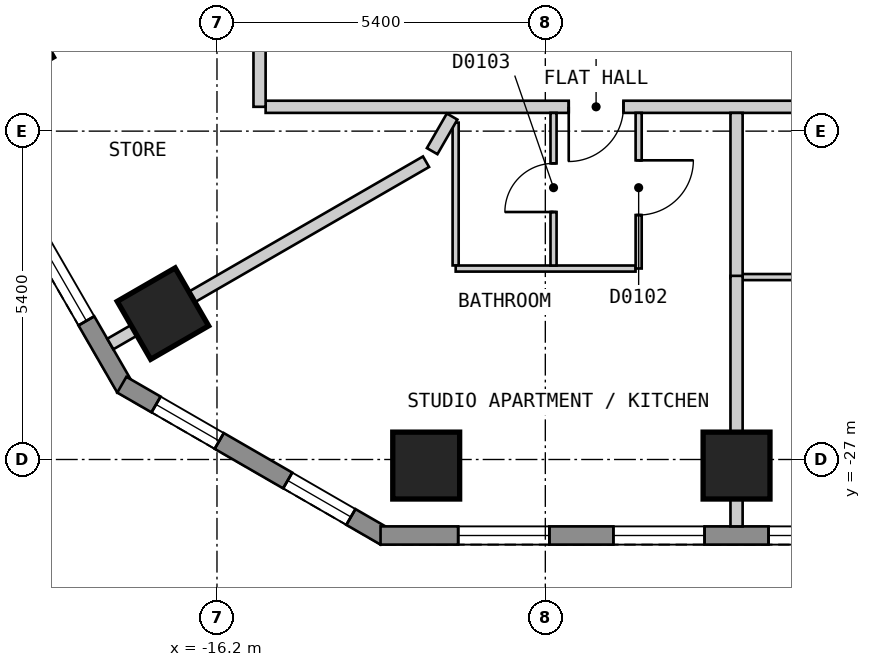
"""IFC4 building model, lengths in metres.
Left out: names, types, materials, properties, quantities, classifications, styles, units other than length and angle.
Written with IfcOpenShell. Run it as: python <this file> out.ifc"""

import sys

from ifc_helpers import new_model, si_unit, direction, frame, frame_2d, origin, origin_2d, place, context, subcontext, project, spatial, polyline, rectangle, outline, extrude, element, fill, save


model = new_model("IFC4")
c1 = context("Model", 3, precision=1e-05, world=origin(), true_north=direction((0.0, 1.0)))
c2 = subcontext(c1, "Body", "Model", "MODEL_VIEW")
j1 = project(units=[si_unit("LENGTHUNIT", "METRE"), si_unit("PLANEANGLEUNIT", "RADIAN")], contexts=[c1])
p1 = place(None, origin())
s1 = spatial("IfcSite", under=j1, at=p1, CompositionType="ELEMENT")
p2 = place(p1, origin())
s2 = spatial("IfcBuilding", under=s1, at=p2, CompositionType="ELEMENT")
p3 = place(p2, frame((0.0, 0.0, 29.4)))
s3 = spatial("IfcBuildingStorey", under=s2, at=p3, CompositionType="ELEMENT", Elevation=29.4)
for number, where, z_axis, x_axis in (
    (1, (-19.641, -20.181, 0.0), (0.0, 0.0, 1.0), (0.5, -0.866, 0.0)),
    (2, (-17.089, -24.601, 0.0), (0.0, 0.0, 1.0), (0.5, -0.866, 0.0)),
    (3, (-12.759, -27.1, 0.0), (0.0, 0.0, 1.0), (1.0, 0.0, 0.0)),
    (4, (-7.655, -27.1, 0.0), (0.0, 0.0, 1.0), (1.0, 0.0, 0.0)),
):
    element("IfcColumn", number, at=place(p3, frame(where, z_axis=z_axis, x_axis=x_axis)), inside=s3, PredefinedType="COLUMN", context=c2, shape_type="SweptSolid", body=[
        extrude(rectangle(XDim=1.1, YDim=1.1, at=origin_2d()), origin(), (0.0, 0.0, 1.0), 3.0),
    ])
p4 = place(p3, frame((-31.22, -2.425, 0.0), z_axis=(0.0, 0.0, 1.0), x_axis=(0.500001938803, -0.866024284413, 0.0)))
e5 = element("IfcWall", 5, at=p4, inside=s3, PredefinedType="SOLIDWALL", context=c2, shape_type="SweptSolid", body=[
    extrude(outline(polyline([(0.0, -0.15), (27.02, -0.15), (26.94, 0.15), (0.08, 0.15), (0.0, -0.15)])), origin(), (0.0, 0.0, 1.0), 2.7),
])
p5 = place(p4, frame((1.277, 0.0, 0.15)))
e6 = element("IfcOpeningElement", 6, at=p5, cuts=e5, PredefinedType="OPENING", context=c2, shape_type="SweptSolid", body=[
    extrude(rectangle(XDim=1.5, YDim=2.1, at=frame_2d((0.75, 1.05))), frame((0.0, 0.16, 0.0), z_axis=(0.0, -1.0, 0.0), x_axis=(1.0, 0.0, 0.0)), (0.0, 0.0, 1.0), 0.32),
])
p6 = place(p4, frame((3.829, 0.0, 0.15)))
e7 = element("IfcOpeningElement", 7, at=p6, cuts=e5, PredefinedType="OPENING", context=c2, shape_type="SweptSolid", body=[
    extrude(rectangle(XDim=1.5, YDim=2.1, at=frame_2d((0.75, 1.05))), frame((0.0, 0.16, 0.0), z_axis=(0.0, -1.0, 0.0), x_axis=(1.0, 0.0, 0.0)), (0.0, 0.0, 1.0), 0.32),
])
p7 = place(p4, frame((6.382, 0.0, 0.15)))
e8 = element("IfcOpeningElement", 8, at=p7, cuts=e5, PredefinedType="OPENING", context=c2, shape_type="SweptSolid", body=[
    extrude(rectangle(XDim=1.5, YDim=2.1, at=frame_2d((0.75, 1.05))), frame((0.0, 0.16, 0.0), z_axis=(0.0, -1.0, 0.0), x_axis=(1.0, 0.0, 0.0)), (0.0, 0.0, 1.0), 0.32),
])
p8 = place(p4, frame((8.933, 0.0, 0.15)))
e9 = element("IfcOpeningElement", 9, at=p8, cuts=e5, PredefinedType="OPENING", context=c2, shape_type="SweptSolid", body=[
    extrude(rectangle(XDim=1.5, YDim=2.1, at=frame_2d((0.75, 1.05))), frame((0.0, 0.16, 0.0), z_axis=(0.0, -1.0, 0.0), x_axis=(1.0, 0.0, 0.0)), (0.0, 0.0, 1.0), 0.32),
])
p9 = place(p4, frame((11.485, 0.0, 0.15)))
e10 = element("IfcOpeningElement", 10, at=p9, cuts=e5, PredefinedType="OPENING", context=c2, shape_type="SweptSolid", body=[
    extrude(rectangle(XDim=1.5, YDim=2.1, at=frame_2d((0.75, 1.05))), frame((0.0, 0.16, 0.0), z_axis=(0.0, -1.0, 0.0), x_axis=(1.0, 0.0, 0.0)), (0.0, 0.0, 1.0), 0.32),
])
p10 = place(p4, frame((14.037, 0.0, 0.15)))
e11 = element("IfcOpeningElement", 11, at=p10, cuts=e5, PredefinedType="OPENING", context=c2, shape_type="SweptSolid", body=[
    extrude(rectangle(XDim=1.5, YDim=2.1, at=frame_2d((0.75, 1.05))), frame((0.0, 0.16, 0.0), z_axis=(0.0, -1.0, 0.0), x_axis=(1.0, 0.0, 0.0)), (0.0, 0.0, 1.0), 0.32),
])
p11 = place(p4, frame((16.589, 0.0, 0.15)))
e12 = element("IfcOpeningElement", 12, at=p11, cuts=e5, PredefinedType="OPENING", context=c2, shape_type="SweptSolid", body=[
    extrude(rectangle(XDim=1.5, YDim=2.1, at=frame_2d((0.75, 1.05))), frame((0.0, 0.16, 0.0), z_axis=(0.0, -1.0, 0.0), x_axis=(1.0, 0.0, 0.0)), (0.0, 0.0, 1.0), 0.32),
])
p12 = place(p4, frame((19.141, 0.0, 0.15)))
e13 = element("IfcOpeningElement", 13, at=p12, cuts=e5, PredefinedType="OPENING", context=c2, shape_type="SweptSolid", body=[
    extrude(rectangle(XDim=1.5, YDim=2.1, at=frame_2d((0.75, 1.05))), frame((0.0, 0.16, 0.0), z_axis=(0.0, -1.0, 0.0), x_axis=(1.0, 0.0, 0.0)), (0.0, 0.0, 1.0), 0.32),
])
p13 = place(p4, frame((21.693, 0.0, 0.15)))
e14 = element("IfcOpeningElement", 14, at=p13, cuts=e5, PredefinedType="OPENING", context=c2, shape_type="SweptSolid", body=[
    extrude(rectangle(XDim=1.5, YDim=2.1, at=frame_2d((0.75, 1.05))), frame((0.0, 0.16, 0.0), z_axis=(0.0, -1.0, 0.0), x_axis=(1.0, 0.0, 0.0)), (0.0, 0.0, 1.0), 0.32),
])
p14 = place(p4, frame((24.244, 0.0, 0.15)))
e15 = element("IfcOpeningElement", 15, at=p14, cuts=e5, PredefinedType="OPENING", context=c2, shape_type="SweptSolid", body=[
    extrude(rectangle(XDim=1.5, YDim=2.1, at=frame_2d((0.75, 1.05))), frame((0.0, 0.16, 0.0), z_axis=(0.0, -1.0, 0.0), x_axis=(1.0, 0.0, 0.0)), (0.0, 0.0, 1.0), 0.32),
])
p15 = place(p3, frame((-17.765, -25.77, 0.0), z_axis=(0.0, 0.0, 1.0), x_axis=(0.866010750942, -0.50002537861, 0.0)))
e16 = element("IfcWall", 16, at=p15, inside=s3, PredefinedType="SOLIDWALL", context=c2, shape_type="SweptSolid", body=[
    extrude(outline(polyline([(0.0, -0.15), (5.0, -0.15), (4.919, 0.15), (0.08, 0.15), (0.0, -0.15)])), origin(), (0.0, 0.0, 1.0), 2.7),
])
p16 = place(p15, frame((0.65, 0.0, 0.15)))
e17 = element("IfcOpeningElement", 17, at=p16, cuts=e16, PredefinedType="OPENING", context=c2, shape_type="SweptSolid", body=[
    extrude(rectangle(XDim=1.2, YDim=2.1, at=frame_2d((0.6, 1.05))), frame((0.0, 0.16, 0.0), z_axis=(0.0, -1.0, 0.0), x_axis=(1.0, 0.0, 0.0)), (0.0, 0.0, 1.0), 0.32),
])
p17 = place(p15, frame((3.15, 0.0, 0.15)))
e18 = element("IfcOpeningElement", 18, at=p17, cuts=e16, PredefinedType="OPENING", context=c2, shape_type="SweptSolid", body=[
    extrude(rectangle(XDim=1.2, YDim=2.1, at=frame_2d((0.6, 1.05))), frame((0.0, 0.16, 0.0), z_axis=(0.0, -1.0, 0.0), x_axis=(1.0, 0.0, 0.0)), (0.0, 0.0, 1.0), 0.32),
])
p18 = place(p3, frame((-13.51, -28.25, 0.0), z_axis=(0.0, 0.0, 1.0), x_axis=(1.0, 0.0, 0.0)))
e19 = element("IfcWall", 19, at=p18, inside=s3, PredefinedType="SOLIDWALL", context=c2, shape_type="SweptSolid", body=[
    extrude(outline(polyline([(0.0, -0.15), (27.02, -0.15), (26.94, 0.15), (0.08, 0.15), (0.0, -0.15)])), origin(), (0.0, 0.0, 1.0), 2.7),
])
p19 = place(p18, frame((1.277, 0.0, 0.15)))
e20 = element("IfcOpeningElement", 20, at=p19, cuts=e19, PredefinedType="OPENING", context=c2, shape_type="SweptSolid", body=[
    extrude(rectangle(XDim=1.5, YDim=2.1, at=frame_2d((0.75, 1.05))), frame((0.0, 0.16, 0.0), z_axis=(0.0, -1.0, 0.0), x_axis=(1.0, 0.0, 0.0)), (0.0, 0.0, 1.0), 0.32),
])
p20 = place(p18, frame((3.829, 0.0, 0.15)))
e21 = element("IfcOpeningElement", 21, at=p20, cuts=e19, PredefinedType="OPENING", context=c2, shape_type="SweptSolid", body=[
    extrude(rectangle(XDim=1.5, YDim=2.1, at=frame_2d((0.75, 1.05))), frame((0.0, 0.16, 0.0), z_axis=(0.0, -1.0, 0.0), x_axis=(1.0, 0.0, 0.0)), (0.0, 0.0, 1.0), 0.32),
])
p21 = place(p18, frame((6.381, 0.0, 0.15)))
e22 = element("IfcOpeningElement", 22, at=p21, cuts=e19, PredefinedType="OPENING", context=c2, shape_type="SweptSolid", body=[
    extrude(rectangle(XDim=1.5, YDim=2.1, at=frame_2d((0.75, 1.05))), frame((0.0, 0.16, 0.0), z_axis=(0.0, -1.0, 0.0), x_axis=(1.0, 0.0, 0.0)), (0.0, 0.0, 1.0), 0.32),
])
p22 = place(p18, frame((8.933, 0.0, 0.15)))
e23 = element("IfcOpeningElement", 23, at=p22, cuts=e19, PredefinedType="OPENING", context=c2, shape_type="SweptSolid", body=[
    extrude(rectangle(XDim=1.5, YDim=2.1, at=frame_2d((0.75, 1.05))), frame((0.0, 0.16, 0.0), z_axis=(0.0, -1.0, 0.0), x_axis=(1.0, 0.0, 0.0)), (0.0, 0.0, 1.0), 0.32),
])
p23 = place(p18, frame((11.485, 0.0, 0.15)))
e24 = element("IfcOpeningElement", 24, at=p23, cuts=e19, PredefinedType="OPENING", context=c2, shape_type="SweptSolid", body=[
    extrude(rectangle(XDim=1.5, YDim=2.1, at=frame_2d((0.75, 1.05))), frame((0.0, 0.16, 0.0), z_axis=(0.0, -1.0, 0.0), x_axis=(1.0, 0.0, 0.0)), (0.0, 0.0, 1.0), 0.32),
])
p24 = place(p18, frame((14.037, 0.0, 0.15)))
e25 = element("IfcOpeningElement", 25, at=p24, cuts=e19, PredefinedType="OPENING", context=c2, shape_type="SweptSolid", body=[
    extrude(rectangle(XDim=1.5, YDim=2.1, at=frame_2d((0.75, 1.05))), frame((0.0, 0.16, 0.0), z_axis=(0.0, -1.0, 0.0), x_axis=(1.0, 0.0, 0.0)), (0.0, 0.0, 1.0), 0.32),
])
p25 = place(p18, frame((16.589, 0.0, 0.15)))
e26 = element("IfcOpeningElement", 26, at=p25, cuts=e19, PredefinedType="OPENING", context=c2, shape_type="SweptSolid", body=[
    extrude(rectangle(XDim=1.5, YDim=2.1, at=frame_2d((0.75, 1.05))), frame((0.0, 0.16, 0.0), z_axis=(0.0, -1.0, 0.0), x_axis=(1.0, 0.0, 0.0)), (0.0, 0.0, 1.0), 0.32),
])
p26 = place(p18, frame((19.141, 0.0, 0.15)))
e27 = element("IfcOpeningElement", 27, at=p26, cuts=e19, PredefinedType="OPENING", context=c2, shape_type="SweptSolid", body=[
    extrude(rectangle(XDim=1.5, YDim=2.1, at=frame_2d((0.75, 1.05))), frame((0.0, 0.16, 0.0), z_axis=(0.0, -1.0, 0.0), x_axis=(1.0, 0.0, 0.0)), (0.0, 0.0, 1.0), 0.32),
])
p27 = place(p18, frame((21.693, 0.0, 0.15)))
e28 = element("IfcOpeningElement", 28, at=p27, cuts=e19, PredefinedType="OPENING", context=c2, shape_type="SweptSolid", body=[
    extrude(rectangle(XDim=1.5, YDim=2.1, at=frame_2d((0.75, 1.05))), frame((0.0, 0.16, 0.0), z_axis=(0.0, -1.0, 0.0), x_axis=(1.0, 0.0, 0.0)), (0.0, 0.0, 1.0), 0.32),
])
p28 = place(p18, frame((24.245, 0.0, 0.15)))
e29 = element("IfcOpeningElement", 29, at=p28, cuts=e19, PredefinedType="OPENING", context=c2, shape_type="SweptSolid", body=[
    extrude(rectangle(XDim=1.5, YDim=2.1, at=frame_2d((0.75, 1.05))), frame((0.0, 0.16, 0.0), z_axis=(0.0, -1.0, 0.0), x_axis=(1.0, 0.0, 0.0)), (0.0, 0.0, 1.0), 0.32),
])
p29 = place(p3, frame((-15.4, -21.2, 0.0), z_axis=(0.0, 0.0, 1.0), x_axis=(1.0, 0.0, 0.0)))
e30 = element("IfcWall", 30, at=p29, inside=s3, PredefinedType="PARTITIONING", context=c2, shape_type="SweptSolid", body=[
    extrude(rectangle(XDim=30.799, YDim=0.2, at=frame_2d((15.399, 0.0))), origin(), (0.0, 0.0, 1.0), 2.7),
])
p30 = place(p29, frame((4.985, 0.0, 0.0)))
e31 = element("IfcOpeningElement", 31, at=p30, cuts=e30, PredefinedType="OPENING", context=c2, shape_type="SweptSolid", body=[
    extrude(rectangle(XDim=0.9, YDim=2.1, at=frame_2d((0.45, 1.05))), frame((0.0, 0.11, 0.0), z_axis=(0.0, -1.0, 0.0), x_axis=(1.0, 0.0, 0.0)), (0.0, 0.0, 1.0), 0.22),
])
p31 = place(p29, frame((14.901, 0.0, 0.0)))
e32 = element("IfcOpeningElement", 32, at=p31, cuts=e30, PredefinedType="OPENING", context=c2, shape_type="SweptSolid", body=[
    extrude(rectangle(XDim=1.0, YDim=2.1, at=frame_2d((0.5, 1.05))), frame((0.0, 0.11, 0.0), z_axis=(0.0, -1.0, 0.0), x_axis=(1.0, 0.0, 0.0)), (0.0, 0.0, 1.0), 0.22),
])
p32 = place(p29, frame((20.005, 0.0, 0.0)))
e33 = element("IfcOpeningElement", 33, at=p32, cuts=e30, PredefinedType="OPENING", context=c2, shape_type="SweptSolid", body=[
    extrude(rectangle(XDim=1.0, YDim=2.1, at=frame_2d((0.5, 1.05))), frame((0.0, 0.11, 0.0), z_axis=(0.0, -1.0, 0.0), x_axis=(1.0, 0.0, 0.0)), (0.0, 0.0, 1.0), 0.22),
])
p33 = place(p29, frame((24.916, 0.0, 0.0)))
e34 = element("IfcOpeningElement", 34, at=p33, cuts=e30, PredefinedType="OPENING", context=c2, shape_type="SweptSolid", body=[
    extrude(rectangle(XDim=0.9, YDim=2.1, at=frame_2d((0.45, 1.05))), frame((0.0, 0.11, 0.0), z_axis=(0.0, -1.0, 0.0), x_axis=(1.0, 0.0, 0.0)), (0.0, 0.0, 1.0), 0.22),
])
p34 = place(p3, frame((-15.5, -21.2, 0.0), z_axis=(0.0, 0.0, 1.0), x_axis=(0.0, 1.0, 0.0)))
e35 = element("IfcWall", 35, at=p34, inside=s3, PredefinedType="PARTITIONING", context=c2, shape_type="SweptSolid", body=[
    extrude(rectangle(XDim=4.8, YDim=0.2, at=frame_2d((2.4, 0.0))), origin(), (0.0, 0.0, 1.0), 2.7),
])
p35 = place(p34, frame((1.258, 0.0, 0.0)))
e36 = element("IfcOpeningElement", 36, at=p35, cuts=e35, PredefinedType="OPENING", context=c2, shape_type="SweptSolid", body=[
    extrude(rectangle(XDim=0.8, YDim=2.1, at=frame_2d((0.4, 1.05))), frame((0.0, 0.11, 0.0), z_axis=(0.0, -1.0, 0.0), x_axis=(1.0, 0.0, 0.0)), (0.0, 0.0, 1.0), 0.22),
])
p36 = place(p3, frame((-12.275, -21.46, 0.0), z_axis=(0.0, 0.0, 1.0), x_axis=(0.0, -1.0, 0.0)))
e37 = element("IfcWall", 37, at=p36, inside=s3, PredefinedType="PARTITIONING", context=c2, shape_type="SweptSolid", body=[
    extrude(rectangle(XDim=2.349, YDim=0.1, at=frame_2d((1.175, 0.0))), origin(), (0.0, 0.0, 1.0), 2.7),
])
p37 = place(p3, frame((-12.274, -23.86, 0.0), z_axis=(0.0, 0.0, 1.0), x_axis=(1.0, 0.0, 0.0)))
e38 = element("IfcWall", 38, at=p37, inside=s3, PredefinedType="PARTITIONING", context=c2, shape_type="SweptSolid", body=[
    extrude(rectangle(XDim=2.958, YDim=0.1, at=frame_2d((1.479, 0.0))), origin(), (0.0, 0.0, 1.0), 2.7),
])
p38 = place(p3, frame((-7.555, -24.0, 0.0), z_axis=(0.0, 0.0, 1.0), x_axis=(1.0, 0.0, 0.0)))
e39 = element("IfcWall", 39, at=p38, inside=s3, PredefinedType="PARTITIONING", context=c2, shape_type="SweptSolid", body=[
    extrude(rectangle(XDim=4.954, YDim=0.1, at=frame_2d((2.477, 0.0))), origin(), (0.0, 0.0, 1.0), 2.7),
])
p39 = place(p38, frame((2.052, 0.0, 0.0)))
e40 = element("IfcOpeningElement", 40, at=p39, cuts=e39, PredefinedType="OPENING", context=c2, shape_type="SweptSolid", body=[
    extrude(rectangle(XDim=0.8, YDim=2.1, at=frame_2d((0.4, 1.05))), frame((0.0, 0.06, 0.0), z_axis=(0.0, -1.0, 0.0), x_axis=(1.0, 0.0, 0.0)), (0.0, 0.0, 1.0), 0.12),
])
p40 = place(p3, frame((-9.265, -23.859, 0.0), z_axis=(0.0, 0.0, 1.0), x_axis=(0.0, 1.0, 0.0)))
e41 = element("IfcWall", 41, at=p40, inside=s3, PredefinedType="PARTITIONING", context=c2, shape_type="SweptSolid", body=[
    extrude(rectangle(XDim=2.559, YDim=0.1, at=frame_2d((1.279, 0.0))), origin(), (0.0, 0.0, 1.0), 2.7),
])
p41 = place(p40, frame((0.879, 0.0, 0.0)))
e42 = element("IfcOpeningElement", 42, at=p41, cuts=e41, PredefinedType="OPENING", context=c2, shape_type="SweptSolid", body=[
    extrude(rectangle(XDim=0.9, YDim=2.1, at=frame_2d((0.45, 1.05))), frame((0.0, 0.06, 0.0), z_axis=(0.0, -1.0, 0.0), x_axis=(1.0, 0.0, 0.0)), (0.0, 0.0, 1.0), 0.12),
])
p42 = place(p3, frame((-10.665, -23.81, 0.0), z_axis=(0.0, 0.0, 1.0), x_axis=(0.0, 1.0, 0.0)))
e43 = element("IfcWall", 43, at=p42, inside=s3, PredefinedType="PARTITIONING", context=c2, shape_type="SweptSolid", body=[
    extrude(rectangle(XDim=2.51, YDim=0.1, at=frame_2d((1.255, 0.0))), origin(), (0.0, 0.0, 1.0), 2.7),
])
p43 = place(p42, frame((0.88, 0.0, 0.0)))
e44 = element("IfcOpeningElement", 44, at=p43, cuts=e43, PredefinedType="OPENING", context=c2, shape_type="SweptSolid", body=[
    extrude(rectangle(XDim=0.8, YDim=2.1, at=frame_2d((0.4, 1.05))), frame((0.0, 0.06, 0.0), z_axis=(0.0, -1.0, 0.0), x_axis=(1.0, 0.0, 0.0)), (0.0, 0.0, 1.0), 0.12),
])
p44 = place(p3, frame((-7.655, -21.3, 0.0), z_axis=(0.0, 0.0, 1.0), x_axis=(0.0, -1.0, 0.0)))
e45 = element("IfcWall", 45, at=p44, inside=s3, PredefinedType="PARTITIONING", context=c2, shape_type="SweptSolid", body=[
    extrude(rectangle(XDim=2.72, YDim=0.2, at=frame_2d((1.36, 0.0))), origin(), (0.0, 0.0, 1.0), 2.7),
])
p45 = place(p3, frame((-12.661, -21.929, 0.0), z_axis=(0.0, 0.0, 1.0), x_axis=(0.499379051742, 0.866383611734, 0.0)))
e46 = element("IfcWall", 46, at=p45, inside=s3, PredefinedType="PARTITIONING", context=c2, shape_type="SweptSolid", body=[
    extrude(rectangle(XDim=0.656, YDim=0.2, at=frame_2d((0.328, 0.0))), origin(), (0.0, 0.0, 1.0), 2.7),
])
p46 = place(p3, frame((-7.655, -28.1, 0.0), z_axis=(0.0, 0.0, 1.0), x_axis=(0.0, 1.0, 0.0)))
e47 = element("IfcWall", 47, at=p46, inside=s3, PredefinedType="PARTITIONING", context=c2, shape_type="SweptSolid", body=[
    extrude(rectangle(XDim=4.12, YDim=0.2, at=frame_2d((2.06, 0.0))), origin(), (0.0, 0.0, 1.0), 2.7),
])
p47 = place(p3, frame((-20.507, -20.681, 0.0), z_axis=(0.0, 0.0, 1.0), x_axis=(0.866028446103, 0.499994730513, 0.0)))
e48 = element("IfcWall", 48, at=p47, inside=s3, PredefinedType="PARTITIONING", context=c2, shape_type="SweptSolid", body=[
    extrude(rectangle(XDim=5.666, YDim=0.2, at=frame_2d((2.833, 0.0))), origin(), (0.0, 0.0, 1.0), 2.7),
])
p48 = place(p3, frame((-17.954, -25.101, 0.0), z_axis=(0.0, 0.0, 1.0), x_axis=(0.865999098103, 0.500045560009, 0.0)))
e49 = element("IfcWall", 49, at=p48, inside=s3, PredefinedType="PARTITIONING", context=c2, shape_type="SweptSolid", body=[
    extrude(rectangle(XDim=5.996, YDim=0.2, at=frame_2d((2.998, 0.0))), origin(), (0.0, 0.0, 1.0), 2.7),
])
p49 = place(p14, origin())
e50 = element("IfcWindow", 50, at=p49, inside=s3, PartitioningType="SINGLE_PANEL", PredefinedType="WINDOW", context=c2, shape_type="SweptSolid", body=[
    extrude(rectangle(XDim=1.5, YDim=2.1, at=frame_2d((0.75, 1.05))), frame((0.0, 0.03, 0.0), z_axis=(0.0, -1.0, 0.0), x_axis=(1.0, 0.0, 0.0)), (0.0, 0.0, 1.0), 0.06),
])
fill(e15, e50)
p50 = place(p16, origin())
e51 = element("IfcWindow", 51, at=p50, inside=s3, PartitioningType="SINGLE_PANEL", PredefinedType="WINDOW", context=c2, shape_type="SweptSolid", body=[
    extrude(rectangle(XDim=1.2, YDim=2.1, at=frame_2d((0.6, 1.05))), frame((0.0, 0.03, 0.0), z_axis=(0.0, -1.0, 0.0), x_axis=(1.0, 0.0, 0.0)), (0.0, 0.0, 1.0), 0.06),
])
fill(e17, e51)
p51 = place(p17, origin())
e52 = element("IfcWindow", 52, at=p51, inside=s3, PartitioningType="SINGLE_PANEL", PredefinedType="WINDOW", context=c2, shape_type="SweptSolid", body=[
    extrude(rectangle(XDim=1.2, YDim=2.1, at=frame_2d((0.6, 1.05))), frame((0.0, 0.03, 0.0), z_axis=(0.0, -1.0, 0.0), x_axis=(1.0, 0.0, 0.0)), (0.0, 0.0, 1.0), 0.06),
])
fill(e18, e52)
p52 = place(p19, origin())
e53 = element("IfcWindow", 53, at=p52, inside=s3, PartitioningType="SINGLE_PANEL", PredefinedType="WINDOW", context=c2, shape_type="SweptSolid", body=[
    extrude(rectangle(XDim=1.5, YDim=2.1, at=frame_2d((0.75, 1.05))), frame((0.0, 0.03, 0.0), z_axis=(0.0, -1.0, 0.0), x_axis=(1.0, 0.0, 0.0)), (0.0, 0.0, 1.0), 0.06),
])
fill(e20, e53)
p53 = place(p20, origin())
e54 = element("IfcWindow", 54, at=p53, inside=s3, PartitioningType="SINGLE_PANEL", PredefinedType="WINDOW", context=c2, shape_type="SweptSolid", body=[
    extrude(rectangle(XDim=1.5, YDim=2.1, at=frame_2d((0.75, 1.05))), frame((0.0, 0.03, 0.0), z_axis=(0.0, -1.0, 0.0), x_axis=(1.0, 0.0, 0.0)), (0.0, 0.0, 1.0), 0.06),
])
fill(e21, e54)
p54 = place(p21, origin())
e55 = element("IfcWindow", 55, at=p54, inside=s3, PartitioningType="SINGLE_PANEL", PredefinedType="WINDOW", context=c2, shape_type="SweptSolid", body=[
    extrude(rectangle(XDim=1.5, YDim=2.1, at=frame_2d((0.75, 1.05))), frame((0.0, 0.03, 0.0), z_axis=(0.0, -1.0, 0.0), x_axis=(1.0, 0.0, 0.0)), (0.0, 0.0, 1.0), 0.06),
])
fill(e22, e55)
p55 = place(p30, origin())
e56 = element("IfcDoor", 56, at=p55, inside=s3, OperationType="SINGLE_SWING_LEFT", PredefinedType="DOOR", context=c2, shape_type="SweptSolid", body=[
    extrude(rectangle(XDim=0.9, YDim=2.1, at=frame_2d((0.45, 1.05))), frame((0.0, 0.025, 0.0), z_axis=(0.0, -1.0, 0.0), x_axis=(1.0, 0.0, 0.0)), (0.0, 0.0, 1.0), 0.05),
])
fill(e31, e56)
p56 = place(p41, origin())
e57 = element("IfcDoor", 57, at=p56, inside=s3, OperationType="SINGLE_SWING_RIGHT", PredefinedType="DOOR", context=c2, shape_type="SweptSolid", body=[
    extrude(rectangle(XDim=0.9, YDim=2.1, at=frame_2d((0.45, 1.05))), frame((0.0, 0.025, 0.0), z_axis=(0.0, -1.0, 0.0), x_axis=(1.0, 0.0, 0.0)), (0.0, 0.0, 1.0), 0.05),
])
fill(e42, e57)
p57 = place(p43, origin())
e58 = element("IfcDoor", 58, at=p57, inside=s3, OperationType="SINGLE_SWING_LEFT", PredefinedType="DOOR", context=c2, shape_type="SweptSolid", body=[
    extrude(rectangle(XDim=0.8, YDim=2.1, at=frame_2d((0.4, 1.05))), frame((0.0, 0.025, 0.0), z_axis=(0.0, -1.0, 0.0), x_axis=(1.0, 0.0, 0.0)), (0.0, 0.0, 1.0), 0.05),
])
fill(e44, e58)
save(model, sys.argv[1])
